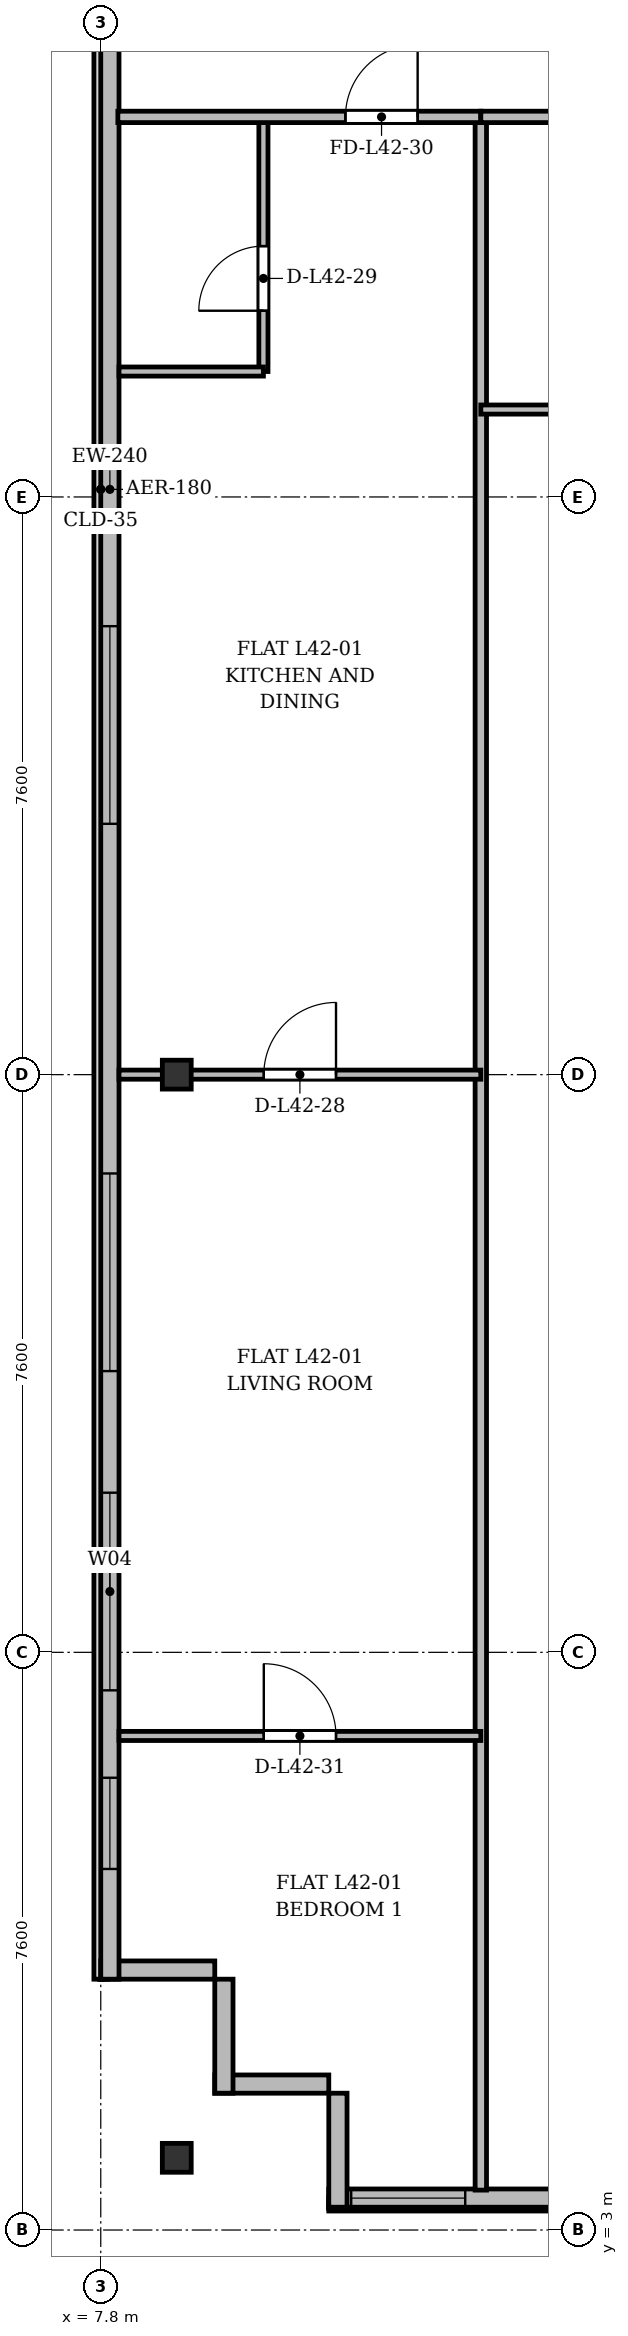
"""IFC4 building model, lengths in metres.
Left out: names, types, materials, properties, quantities, classifications, styles, units other than length and angle.
Written with IfcOpenShell. Run it as: python <this file> out.ifc"""

import sys

from ifc_helpers import new_model, si_unit, direction, frame, frame_2d, origin, origin_2d, place, context, subcontext, project, spatial, rectangle, i_section, extrude, source, transform, mapped, element, fill, save


model = new_model("IFC4")
c1 = context("Model", 3, precision=1e-05, world=origin(), true_north=direction((0.0, 1.0)))
c2 = subcontext(c1, "Body", "Model", "MODEL_VIEW")
j1 = project(units=[si_unit("LENGTHUNIT", "METRE"), si_unit("PLANEANGLEUNIT", "RADIAN")], contexts=[c1])
p1 = place(None, origin())
s1 = spatial("IfcSite", under=j1, at=p1, CompositionType="ELEMENT")
p2 = place(p1, origin())
s2 = spatial("IfcBuilding", under=s1, at=p2, CompositionType="ELEMENT")
p3 = place(p2, frame((0.0, 0.0, 160.9)))
s3 = spatial("IfcBuildingStorey", under=s2, at=p3, CompositionType="ELEMENT", Elevation=160.9)
m1 = source(origin(), c2, "Body", "SweptSolid", [
    extrude(i_section(OverallWidth=0.38, OverallDepth=0.38, WebThickness=0.02, FlangeThickness=0.03, at=origin_2d()), origin(), (0.0, 0.0, 1.0), 3.6),
])
for number, where, z_axis, x_axis in (
    (1, (8.8, 3.95, 0.0), (0.0, 0.0, 1.0), (1.0, 0.0, 0.0)),
    (2, (8.8, 18.2, 0.0), (0.0, 0.0, 1.0), (1.0, 0.0, 0.0)),
):
    element("IfcColumn", number, at=place(p3, frame(where, z_axis=z_axis, x_axis=x_axis)), inside=s3, PredefinedType="COLUMN", context=c2, shape_type="MappedRepresentation", body=[
        mapped(m1, transform((0.0, 0.0, 0.0), x_axis=(1.0, 0.0, 0.0), y_axis=(0.0, 1.0, 0.0), z_axis=(0.0, 0.0, 1.0), scale=1.0)),
    ])
for number, where, z_axis, x_axis in (
    (3, (10.8, 4.92, 0.0), (0.0, 0.0, 1.0), (-1.0, 0.0, 0.0)),
    (4, (9.42, 4.8, 0.0), (0.0, 0.0, 1.0), (0.0, 1.0, 0.0)),
):
    element("IfcWall", number, at=place(p3, frame(where, z_axis=z_axis, x_axis=x_axis)), inside=s3, PredefinedType="SOLIDWALL", context=c2, shape_type="SweptSolid", body=[
        extrude(rectangle(XDim=1.5, YDim=0.24, at=frame_2d((0.75, 0.0))), origin(), (0.0, 0.0, 1.0), 3.35),
    ])
p4 = place(p3, frame((9.3, 6.42, 0.0), z_axis=(0.0, 0.0, 1.0), x_axis=(-1.0, 0.0, 0.0)))
e5 = element("IfcWall", 5, at=p4, inside=s3, PredefinedType="SOLIDWALL", context=c2, shape_type="SweptSolid", body=[
    extrude(rectangle(XDim=1.5, YDim=0.24, at=frame_2d((0.75, 0.0))), origin(), (0.0, 0.0, 1.0), 2.85),
])
p5 = place(p3, frame((7.92, 6.3, 0.0), z_axis=(0.0, 0.0, 1.0), x_axis=(0.0, 1.0, 0.0)))
e6 = element("IfcWall", 6, at=p5, inside=s3, PredefinedType="SOLIDWALL", context=c2, shape_type="SweptSolid", body=[
    extrude(rectangle(XDim=39.2, YDim=0.24, at=frame_2d((19.6, 0.0))), origin(), (0.0, 0.0, 1.0), 3.35),
])
p6 = place(p5, frame((1.45, 0.0, 0.92)))
e7 = element("IfcOpeningElement", 7, at=p6, cuts=e6, PredefinedType="OPENING", context=c2, shape_type="SweptSolid", body=[
    extrude(rectangle(XDim=1.2, YDim=1.65, at=frame_2d((0.6, 0.825))), frame((0.0, 0.13, 0.0), z_axis=(0.0, -1.0, 0.0), x_axis=(1.0, 0.0, 0.0)), (0.0, 0.0, 1.0), 0.26),
])
p7 = place(p5, frame((3.8, 0.0, 0.92)))
e8 = element("IfcOpeningElement", 8, at=p7, cuts=e6, PredefinedType="OPENING", context=c2, shape_type="SweptSolid", body=[
    extrude(rectangle(XDim=2.6, YDim=1.9, at=frame_2d((1.3, 0.95))), frame((0.0, 0.13, 0.0), z_axis=(0.0, -1.0, 0.0), x_axis=(1.0, 0.0, 0.0)), (0.0, 0.0, 1.0), 0.26),
])
p8 = place(p5, frame((8.0, 0.0, 0.92)))
e9 = element("IfcOpeningElement", 9, at=p8, cuts=e6, PredefinedType="OPENING", context=c2, shape_type="SweptSolid", body=[
    extrude(rectangle(XDim=2.6, YDim=1.9, at=frame_2d((1.3, 0.95))), frame((0.0, 0.13, 0.0), z_axis=(0.0, -1.0, 0.0), x_axis=(1.0, 0.0, 0.0)), (0.0, 0.0, 1.0), 0.26),
])
p9 = place(p5, frame((15.2, 0.0, 0.92)))
e10 = element("IfcOpeningElement", 10, at=p9, cuts=e6, PredefinedType="OPENING", context=c2, shape_type="SweptSolid", body=[
    extrude(rectangle(XDim=2.6, YDim=1.9, at=frame_2d((1.3, 0.95))), frame((0.0, 0.13, 0.0), z_axis=(0.0, -1.0, 0.0), x_axis=(1.0, 0.0, 0.0)), (0.0, 0.0, 1.0), 0.26),
])
p10 = place(p5, frame((29.2, 0.0, 0.92)))
e11 = element("IfcOpeningElement", 11, at=p10, cuts=e6, PredefinedType="OPENING", context=c2, shape_type="SweptSolid", body=[
    extrude(rectangle(XDim=2.6, YDim=1.9, at=frame_2d((1.3, 0.95))), frame((0.0, 0.13, 0.0), z_axis=(0.0, -1.0, 0.0), x_axis=(1.0, 0.0, 0.0)), (0.0, 0.0, 1.0), 0.26),
])
p11 = place(p5, frame((33.5, 0.0, 0.92)))
e12 = element("IfcOpeningElement", 12, at=p11, cuts=e6, PredefinedType="OPENING", context=c2, shape_type="SweptSolid", body=[
    extrude(rectangle(XDim=1.2, YDim=1.65, at=frame_2d((0.6, 0.825))), frame((0.0, 0.13, 0.0), z_axis=(0.0, -1.0, 0.0), x_axis=(1.0, 0.0, 0.0)), (0.0, 0.0, 1.0), 0.26),
])
p12 = place(p5, frame((36.85, 0.0, 0.92)))
e13 = element("IfcOpeningElement", 13, at=p12, cuts=e6, PredefinedType="OPENING", context=c2, shape_type="SweptSolid", body=[
    extrude(rectangle(XDim=1.2, YDim=1.65, at=frame_2d((0.6, 0.825))), frame((0.0, 0.13, 0.0), z_axis=(0.0, -1.0, 0.0), x_axis=(1.0, 0.0, 0.0)), (0.0, 0.0, 1.0), 0.26),
])
p13 = place(p3, frame((63.6, 3.42, 0.0), z_axis=(0.0, 0.0, 1.0), x_axis=(-1.0, 0.0, 0.0)))
e14 = element("IfcWall", 14, at=p13, inside=s3, PredefinedType="SOLIDWALL", context=c2, shape_type="SweptSolid", body=[
    extrude(rectangle(XDim=52.8, YDim=0.24, at=frame_2d((26.4, 0.0))), origin(), (0.0, 0.0, 1.0), 3.35),
])
p14 = place(p13, frame((0.295, 0.0, 0.9)))
e15 = element("IfcOpeningElement", 15, at=p14, cuts=e14, PredefinedType="OPENING", context=c2, shape_type="SweptSolid", body=[
    extrude(rectangle(XDim=1.5, YDim=1.75, at=frame_2d((0.75, 0.875))), frame((0.0, 0.13, 0.0), z_axis=(0.0, -1.0, 0.0), x_axis=(1.0, 0.0, 0.0)), (0.0, 0.0, 1.0), 0.26),
])
p15 = place(p13, frame((3.7, 0.0, 0.9)))
e16 = element("IfcOpeningElement", 16, at=p15, cuts=e14, PredefinedType="OPENING", context=c2, shape_type="SweptSolid", body=[
    extrude(rectangle(XDim=2.0, YDim=1.95, at=frame_2d((1.0, 0.975))), frame((0.0, 0.13, 0.0), z_axis=(0.0, -1.0, 0.0), x_axis=(1.0, 0.0, 0.0)), (0.0, 0.0, 1.0), 0.26),
])
p16 = place(p13, frame((7.635, 0.0, 0.0)))
e17 = element("IfcOpeningElement", 17, at=p16, cuts=e14, PredefinedType="OPENING", context=c2, shape_type="SweptSolid", body=[
    extrude(rectangle(XDim=1.2, YDim=2.2, at=frame_2d((0.6, 1.1))), frame((0.0, 0.13, 0.0), z_axis=(0.0, -1.0, 0.0), x_axis=(1.0, 0.0, 0.0)), (0.0, 0.0, 1.0), 0.26),
])
p17 = place(p13, frame((9.7, 0.0, 0.9)))
e18 = element("IfcOpeningElement", 18, at=p17, cuts=e14, PredefinedType="OPENING", context=c2, shape_type="SweptSolid", body=[
    extrude(rectangle(XDim=1.8, YDim=1.8, at=frame_2d((0.9, 0.9))), frame((0.0, 0.13, 0.0), z_axis=(0.0, -1.0, 0.0), x_axis=(1.0, 0.0, 0.0)), (0.0, 0.0, 1.0), 0.26),
])
p18 = place(p13, frame((12.25, 0.0, 0.9)))
e19 = element("IfcOpeningElement", 19, at=p18, cuts=e14, PredefinedType="OPENING", context=c2, shape_type="SweptSolid", body=[
    extrude(rectangle(XDim=1.5, YDim=1.75, at=frame_2d((0.75, 0.875))), frame((0.0, 0.13, 0.0), z_axis=(0.0, -1.0, 0.0), x_axis=(1.0, 0.0, 0.0)), (0.0, 0.0, 1.0), 0.26),
])
p19 = place(p13, frame((16.25, 0.0, 0.9)))
e20 = element("IfcOpeningElement", 20, at=p19, cuts=e14, PredefinedType="OPENING", context=c2, shape_type="SweptSolid", body=[
    extrude(rectangle(XDim=1.5, YDim=1.75, at=frame_2d((0.75, 0.875))), frame((0.0, 0.13, 0.0), z_axis=(0.0, -1.0, 0.0), x_axis=(1.0, 0.0, 0.0)), (0.0, 0.0, 1.0), 0.26),
])
p20 = place(p13, frame((22.4, 0.0, 0.9)))
e21 = element("IfcOpeningElement", 21, at=p20, cuts=e14, PredefinedType="OPENING", context=c2, shape_type="SweptSolid", body=[
    extrude(rectangle(XDim=2.0, YDim=1.95, at=frame_2d((1.0, 0.975))), frame((0.0, 0.13, 0.0), z_axis=(0.0, -1.0, 0.0), x_axis=(1.0, 0.0, 0.0)), (0.0, 0.0, 1.0), 0.26),
])
p21 = place(p13, frame((27.675, 0.0, 0.9)))
e22 = element("IfcOpeningElement", 22, at=p21, cuts=e14, PredefinedType="OPENING", context=c2, shape_type="SweptSolid", body=[
    extrude(rectangle(XDim=1.65, YDim=1.85, at=frame_2d((0.825, 0.925))), frame((0.0, 0.13, 0.0), z_axis=(0.0, -1.0, 0.0), x_axis=(1.0, 0.0, 0.0)), (0.0, 0.0, 1.0), 0.26),
])
p22 = place(p13, frame((30.6, 0.0, 0.9)))
e23 = element("IfcOpeningElement", 23, at=p22, cuts=e14, PredefinedType="OPENING", context=c2, shape_type="SweptSolid", body=[
    extrude(rectangle(XDim=1.8, YDim=1.8, at=frame_2d((0.9, 0.9))), frame((0.0, 0.13, 0.0), z_axis=(0.0, -1.0, 0.0), x_axis=(1.0, 0.0, 0.0)), (0.0, 0.0, 1.0), 0.26),
])
p23 = place(p13, frame((34.1, 0.0, 0.9)))
e24 = element("IfcOpeningElement", 24, at=p23, cuts=e14, PredefinedType="OPENING", context=c2, shape_type="SweptSolid", body=[
    extrude(rectangle(XDim=2.2, YDim=1.8, at=frame_2d((1.1, 0.9))), frame((0.0, 0.13, 0.0), z_axis=(0.0, -1.0, 0.0), x_axis=(1.0, 0.0, 0.0)), (0.0, 0.0, 1.0), 0.26),
])
p24 = place(p13, frame((39.65, 0.0, 0.9)))
e25 = element("IfcOpeningElement", 25, at=p24, cuts=e14, PredefinedType="OPENING", context=c2, shape_type="SweptSolid", body=[
    extrude(rectangle(XDim=1.5, YDim=1.75, at=frame_2d((0.75, 0.875))), frame((0.0, 0.13, 0.0), z_axis=(0.0, -1.0, 0.0), x_axis=(1.0, 0.0, 0.0)), (0.0, 0.0, 1.0), 0.26),
])
p25 = place(p13, frame((43.65, 0.0, 0.9)))
e26 = element("IfcOpeningElement", 26, at=p25, cuts=e14, PredefinedType="OPENING", context=c2, shape_type="SweptSolid", body=[
    extrude(rectangle(XDim=1.5, YDim=1.75, at=frame_2d((0.75, 0.875))), frame((0.0, 0.13, 0.0), z_axis=(0.0, -1.0, 0.0), x_axis=(1.0, 0.0, 0.0)), (0.0, 0.0, 1.0), 0.26),
])
p26 = place(p13, frame((47.275, 0.0, 0.9)))
e27 = element("IfcOpeningElement", 27, at=p26, cuts=e14, PredefinedType="OPENING", context=c2, shape_type="SweptSolid", body=[
    extrude(rectangle(XDim=1.65, YDim=1.85, at=frame_2d((0.825, 0.925))), frame((0.0, 0.13, 0.0), z_axis=(0.0, -1.0, 0.0), x_axis=(1.0, 0.0, 0.0)), (0.0, 0.0, 1.0), 0.26),
])
p27 = place(p13, frame((51.005, 0.0, 0.9)))
e28 = element("IfcOpeningElement", 28, at=p27, cuts=e14, PredefinedType="OPENING", context=c2, shape_type="SweptSolid", body=[
    extrude(rectangle(XDim=1.5, YDim=1.75, at=frame_2d((0.75, 0.875))), frame((0.0, 0.13, 0.0), z_axis=(0.0, -1.0, 0.0), x_axis=(1.0, 0.0, 0.0)), (0.0, 0.0, 1.0), 0.26),
])
p28 = place(p13, frame((37.85, 0.0, 0.0)))
e29 = element("IfcOpeningElement", 29, at=p28, cuts=e14, PredefinedType="OPENING", context=c2, shape_type="SweptSolid", body=[
    extrude(rectangle(XDim=1.2, YDim=2.2, at=frame_2d((0.6, 1.1))), frame((0.0, 0.13, 0.0), z_axis=(0.0, -1.0, 0.0), x_axis=(1.0, 0.0, 0.0)), (0.0, 0.0, 1.0), 0.26),
])
p29 = place(p3, frame((10.92, 3.3, 0.0), z_axis=(0.0, 0.0, 1.0), x_axis=(0.0, 1.0, 0.0)))
e30 = element("IfcWall", 30, at=p29, inside=s3, PredefinedType="SOLIDWALL", context=c2, shape_type="SweptSolid", body=[
    extrude(rectangle(XDim=1.5, YDim=0.24, at=frame_2d((0.75, 0.0))), origin(), (0.0, 0.0, 1.0), 2.75),
])
p30 = place(p3, frame((12.8, 3.525, 0.0), z_axis=(0.0, 0.0, 1.0), x_axis=(0.0, 1.0, 0.0)))
e31 = element("IfcWall", 31, at=p30, inside=s3, PredefinedType="PARTITIONING", context=c2, shape_type="SweptSolid", body=[
    extrude(rectangle(XDim=27.275, YDim=0.15, at=frame_2d((13.638, 0.0))), origin(), (0.0, 0.0, 1.0), 2.75),
])
p31 = place(p3, frame((8.04, 18.2, 0.0), z_axis=(0.0, 0.0, 1.0), x_axis=(1.0, 0.0, 0.0)))
e32 = element("IfcWall", 32, at=p31, inside=s3, PredefinedType="PARTITIONING", context=c2, shape_type="SweptSolid", body=[
    extrude(rectangle(XDim=4.76, YDim=0.12, at=frame_2d((2.38, 0.0))), origin(), (0.0, 0.0, 1.0), 2.75),
])
p32 = place(p31, frame((1.905, 0.0, 0.0)))
e33 = element("IfcOpeningElement", 33, at=p32, cuts=e32, PredefinedType="OPENING", context=c2, shape_type="SweptSolid", body=[
    extrude(rectangle(XDim=0.95, YDim=2.15, at=frame_2d((0.475, 1.075))), frame((0.0, 0.07, 0.0), z_axis=(0.0, -1.0, 0.0), x_axis=(1.0, 0.0, 0.0)), (0.0, 0.0, 1.0), 0.14),
])
p33 = place(p3, frame((9.94, 27.45, 0.0), z_axis=(0.0, 0.0, 1.0), x_axis=(0.0, 1.0, 0.0)))
e34 = element("IfcWall", 34, at=p33, inside=s3, PredefinedType="PARTITIONING", context=c2, shape_type="SweptSolid", body=[
    extrude(rectangle(XDim=3.35, YDim=0.12, at=frame_2d((1.675, 0.0))), origin(), (0.0, 0.0, 1.0), 3.35),
])
p34 = place(p33, frame((0.8, 0.0, 0.0)))
e35 = element("IfcOpeningElement", 35, at=p34, cuts=e34, PredefinedType="OPENING", context=c2, shape_type="SweptSolid", body=[
    extrude(rectangle(XDim=0.85, YDim=2.1, at=frame_2d((0.425, 1.05))), frame((0.0, 0.07, 0.0), z_axis=(0.0, -1.0, 0.0), x_axis=(1.0, 0.0, 0.0)), (0.0, 0.0, 1.0), 0.14),
])
p35 = place(p3, frame((8.04, 27.45, 0.0), z_axis=(0.0, 0.0, 1.0), x_axis=(1.0, 0.0, 0.0)))
e36 = element("IfcWall", 36, at=p35, inside=s3, PredefinedType="PARTITIONING", context=c2, shape_type="SweptSolid", body=[
    extrude(rectangle(XDim=1.9, YDim=0.12, at=frame_2d((0.95, 0.0))), origin(), (0.0, 0.0, 1.0), 2.85),
])
p36 = place(p3, frame((8.025, 30.8, 0.0), z_axis=(0.0, 0.0, 1.0), x_axis=(1.0, 0.0, 0.0)))
e37 = element("IfcWall", 37, at=p36, inside=s3, PredefinedType="PARTITIONING", context=c2, shape_type="SweptSolid", body=[
    extrude(rectangle(XDim=4.775, YDim=0.15, at=frame_2d((2.388, 0.0))), origin(), (0.0, 0.0, 1.0), 2.85),
])
p37 = place(p36, frame((2.994, 0.0, 0.0)))
e38 = element("IfcOpeningElement", 38, at=p37, cuts=e37, PredefinedType="OPENING", context=c2, shape_type="SweptSolid", body=[
    extrude(rectangle(XDim=0.95, YDim=2.15, at=frame_2d((0.475, 1.075))), frame((0.0, 0.085, 0.0), z_axis=(0.0, -1.0, 0.0), x_axis=(1.0, 0.0, 0.0)), (0.0, 0.0, 1.0), 0.17),
])
p38 = place(p3, frame((8.04, 9.5, 0.0), z_axis=(0.0, 0.0, 1.0), x_axis=(1.0, 0.0, 0.0)))
e39 = element("IfcWall", 39, at=p38, inside=s3, PredefinedType="PARTITIONING", context=c2, shape_type="SweptSolid", body=[
    extrude(rectangle(XDim=4.76, YDim=0.12, at=frame_2d((2.38, 0.0))), origin(), (0.0, 0.0, 1.0), 2.85),
])
p39 = place(p38, frame((1.905, 0.0, 0.0)))
e40 = element("IfcOpeningElement", 40, at=p39, cuts=e39, PredefinedType="OPENING", context=c2, shape_type="SweptSolid", body=[
    extrude(rectangle(XDim=0.95, YDim=2.15, at=frame_2d((0.475, 1.075))), frame((0.0, 0.07, 0.0), z_axis=(0.0, -1.0, 0.0), x_axis=(1.0, 0.0, 0.0)), (0.0, 0.0, 1.0), 0.14),
])
p40 = place(p3, frame((12.8, 30.8, 0.0), z_axis=(0.0, 0.0, 1.0), x_axis=(1.0, 0.0, 0.0)))
e41 = element("IfcWall", 41, at=p40, inside=s3, PredefinedType="PARTITIONING", context=c2, shape_type="SweptSolid", body=[
    extrude(rectangle(XDim=5.4, YDim=0.15, at=frame_2d((2.7, 0.0))), origin(), (0.0, 0.0, 1.0), 2.85),
])
p41 = place(p40, frame((2.225, 0.0, 0.0)))
e42 = element("IfcOpeningElement", 42, at=p41, cuts=e41, PredefinedType="OPENING", context=c2, shape_type="SweptSolid", body=[
    extrude(rectangle(XDim=0.95, YDim=2.15, at=frame_2d((0.475, 1.075))), frame((0.0, 0.085, 0.0), z_axis=(0.0, -1.0, 0.0), x_axis=(1.0, 0.0, 0.0)), (0.0, 0.0, 1.0), 0.17),
])
p42 = place(p3, frame((12.8, 26.95, 0.0), z_axis=(0.0, 0.0, 1.0), x_axis=(1.0, 0.0, 0.0)))
e43 = element("IfcWall", 43, at=p42, inside=s3, PredefinedType="PARTITIONING", context=c2, shape_type="SweptSolid", body=[
    extrude(rectangle(XDim=5.4, YDim=0.12, at=frame_2d((2.7, 0.0))), origin(), (0.0, 0.0, 1.0), 2.85),
])
p43 = place(p42, frame((2.225, 0.0, 0.0)))
e44 = element("IfcOpeningElement", 44, at=p43, cuts=e43, PredefinedType="OPENING", context=c2, shape_type="SweptSolid", body=[
    extrude(rectangle(XDim=0.95, YDim=2.15, at=frame_2d((0.475, 1.075))), frame((0.0, 0.07, 0.0), z_axis=(0.0, -1.0, 0.0), x_axis=(1.0, 0.0, 0.0)), (0.0, 0.0, 1.0), 0.14),
])
m2 = source(origin(), c2, "Body", "SweptSolid", [
    extrude(rectangle(XDim=1.2, YDim=1.65, at=frame_2d((0.6, 0.825))), frame((0.0, 0.03, 0.0), z_axis=(0.0, -1.0, 0.0), x_axis=(1.0, 0.0, 0.0)), (0.0, 0.0, 1.0), 0.06),
])
p44 = place(p6, origin())
e45 = element("IfcWindow", 45, at=p44, inside=s3, PartitioningType="SINGLE_PANEL", PredefinedType="WINDOW", context=c2, shape_type="MappedRepresentation", body=[
    mapped(m2, transform((0.0, 0.0, 0.0), x_axis=(1.0, 0.0, 0.0), y_axis=(0.0, 1.0, 0.0), z_axis=(0.0, 0.0, 1.0), scale=1.0)),
])
fill(e7, e45)
m3 = source(origin(), c2, "Body", "SweptSolid", [
    extrude(rectangle(XDim=2.6, YDim=1.9, at=frame_2d((1.3, 0.95))), frame((0.0, 0.03, 0.0), z_axis=(0.0, -1.0, 0.0), x_axis=(1.0, 0.0, 0.0)), (0.0, 0.0, 1.0), 0.06),
])
p45 = place(p7, origin())
e46 = element("IfcWindow", 46, at=p45, inside=s3, PartitioningType="SINGLE_PANEL", PredefinedType="WINDOW", context=c2, shape_type="MappedRepresentation", body=[
    mapped(m3, transform((0.0, 0.0, 0.0), x_axis=(1.0, 0.0, 0.0), y_axis=(0.0, 1.0, 0.0), z_axis=(0.0, 0.0, 1.0), scale=1.0)),
])
fill(e8, e46)
p46 = place(p8, origin())
e47 = element("IfcWindow", 47, at=p46, inside=s3, PartitioningType="SINGLE_PANEL", PredefinedType="WINDOW", context=c2, shape_type="MappedRepresentation", body=[
    mapped(m3, transform((0.0, 0.0, 0.0), x_axis=(1.0, 0.0, 0.0), y_axis=(0.0, 1.0, 0.0), z_axis=(0.0, 0.0, 1.0), scale=1.0)),
])
fill(e9, e47)
p47 = place(p9, origin())
e48 = element("IfcWindow", 48, at=p47, inside=s3, PartitioningType="SINGLE_PANEL", PredefinedType="WINDOW", context=c2, shape_type="MappedRepresentation", body=[
    mapped(m3, transform((0.0, 0.0, 0.0), x_axis=(1.0, 0.0, 0.0), y_axis=(0.0, 1.0, 0.0), z_axis=(0.0, 0.0, 1.0), scale=1.0)),
])
fill(e10, e48)
m4 = source(origin(), c2, "Body", "SweptSolid", [
    extrude(rectangle(XDim=1.5, YDim=1.75, at=frame_2d((0.75, 0.875))), frame((0.0, 0.03, 0.0), z_axis=(0.0, -1.0, 0.0), x_axis=(1.0, 0.0, 0.0)), (0.0, 0.0, 1.0), 0.06),
])
p48 = place(p27, origin())
e49 = element("IfcWindow", 49, at=p48, inside=s3, PartitioningType="SINGLE_PANEL", PredefinedType="WINDOW", context=c2, shape_type="MappedRepresentation", body=[
    mapped(m4, transform((0.0, 0.0, 0.0), x_axis=(1.0, 0.0, 0.0), y_axis=(0.0, 1.0, 0.0), z_axis=(0.0, 0.0, 1.0), scale=1.0)),
])
fill(e28, e49)
m5 = source(origin(), c2, "Body", "SweptSolid", [
    extrude(rectangle(XDim=0.95, YDim=2.15, at=frame_2d((0.475, 1.075))), frame((0.0, 0.025, 0.0), z_axis=(0.0, -1.0, 0.0), x_axis=(1.0, 0.0, 0.0)), (0.0, 0.0, 1.0), 0.05),
])
p49 = place(p32, origin())
e50 = element("IfcDoor", 50, at=p49, inside=s3, OperationType="SINGLE_SWING_RIGHT", PredefinedType="DOOR", context=c2, shape_type="MappedRepresentation", body=[
    mapped(m5, transform((0.0, 0.0, 0.0), x_axis=(1.0, 0.0, 0.0), y_axis=(0.0, 1.0, 0.0), z_axis=(0.0, 0.0, 1.0), scale=1.0)),
])
fill(e33, e50)
m6 = source(origin(), c2, "Body", "SweptSolid", [
    extrude(rectangle(XDim=0.85, YDim=2.1, at=frame_2d((0.425, 1.05))), frame((0.0, 0.025, 0.0), z_axis=(0.0, -1.0, 0.0), x_axis=(1.0, 0.0, 0.0)), (0.0, 0.0, 1.0), 0.05),
])
p50 = place(p34, origin())
e51 = element("IfcDoor", 51, at=p50, inside=s3, OperationType="SINGLE_SWING_LEFT", PredefinedType="DOOR", context=c2, shape_type="MappedRepresentation", body=[
    mapped(m6, transform((0.0, 0.0, 0.0), x_axis=(1.0, 0.0, 0.0), y_axis=(0.0, 1.0, 0.0), z_axis=(0.0, 0.0, 1.0), scale=1.0)),
])
fill(e35, e51)
p51 = place(p37, origin())
e52 = element("IfcDoor", 52, at=p51, inside=s3, OperationType="SINGLE_SWING_RIGHT", PredefinedType="DOOR", context=c2, shape_type="MappedRepresentation", body=[
    mapped(m5, transform((0.0, 0.0, 0.0), x_axis=(1.0, 0.0, 0.0), y_axis=(0.0, 1.0, 0.0), z_axis=(0.0, 0.0, 1.0), scale=1.0)),
])
fill(e38, e52)
p52 = place(p39, origin())
e53 = element("IfcDoor", 53, at=p52, inside=s3, OperationType="SINGLE_SWING_LEFT", PredefinedType="DOOR", context=c2, shape_type="MappedRepresentation", body=[
    mapped(m5, transform((0.0, 0.0, 0.0), x_axis=(1.0, 0.0, 0.0), y_axis=(0.0, 1.0, 0.0), z_axis=(0.0, 0.0, 1.0), scale=1.0)),
])
fill(e40, e53)
save(model, sys.argv[1])
